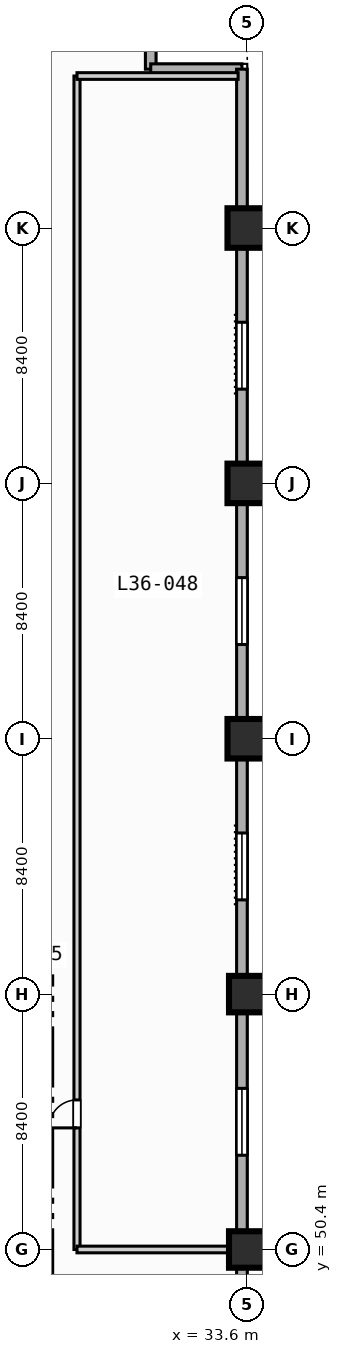
"""IFC4 building model, lengths in metres.
Left out: names, types, materials, properties, quantities, classifications, styles, units other than length and angle.
Written with IfcOpenShell. Run it as: python <this file> out.ifc"""

import sys

from ifc_helpers import new_model, si_unit, direction, frame, frame_2d, origin, origin_2d, place, context, subcontext, project, spatial, rectangle, extrude, element, fill, save


model = new_model("IFC4")
c1 = context("Model", 3, precision=1e-05, world=origin(), true_north=direction((0.0, 1.0)))
c2 = subcontext(c1, "Body", "Model", "MODEL_VIEW")
j1 = project(units=[si_unit("LENGTHUNIT", "METRE"), si_unit("PLANEANGLEUNIT", "RADIAN")], contexts=[c1])
p1 = place(None, origin())
s1 = spatial("IfcSite", under=j1, at=p1, CompositionType="ELEMENT")
p2 = place(p1, origin())
s2 = spatial("IfcBuilding", under=s1, at=p2, CompositionType="ELEMENT")
p3 = place(p2, frame((0.0, 0.0, 149.4)))
s3 = spatial("IfcBuildingStorey", under=s2, at=p3, CompositionType="ELEMENT", Elevation=149.4)
for number, where, z_axis, x_axis in (
    (1, (33.6, 50.4, 0.0), (0.0, 0.0, 1.0), (1.0, 0.0, 0.0)),
    (2, (33.6, 58.8, 0.0), (0.0, 0.0, 1.0), (1.0, 0.0, 0.0)),
):
    element("IfcColumn", number, at=place(p3, frame(where, z_axis=z_axis, x_axis=x_axis)), inside=s3, PredefinedType="COLUMN", context=c2, shape_type="SweptSolid", body=[
        extrude(rectangle(XDim=1.2, YDim=1.2, at=origin_2d()), origin(), (0.0, 0.0, 1.0), 3.8),
    ])
for number, where, z_axis, x_axis in (
    (3, (33.6, 67.2, 0.0), (0.0, 0.0, 1.0), (1.0, 0.0, 0.0)),
    (4, (33.6, 75.6, 0.0), (0.0, 0.0, 1.0), (1.0, 0.0, 0.0)),
    (5, (33.6, 84.0, 0.0), (0.0, 0.0, 1.0), (1.0, 0.0, 0.0)),
):
    element("IfcColumn", number, at=place(p3, frame(where, z_axis=z_axis, x_axis=x_axis)), inside=s3, PredefinedType="COLUMN", context=c2, shape_type="SweptSolid", body=[
        extrude(rectangle(XDim=1.3, YDim=1.3, at=origin_2d()), origin(), (0.0, 0.0, 1.0), 3.8),
    ])
for number, where, z_axis, x_axis in (
    (6, (30.425, 92.225, 0.0), (0.0, 0.0, 1.0), (0.0, -1.0, 0.0)),
    (7, (30.425, 89.225, 0.0), (0.0, 0.0, 1.0), (1.0, 0.0, 0.0)),
):
    element("IfcWall", number, at=place(p3, frame(where, z_axis=z_axis, x_axis=x_axis)), inside=s3, PredefinedType="STANDARD", context=c2, shape_type="SweptSolid", body=[
        extrude(rectangle(XDim=3.0, YDim=0.35, at=frame_2d((1.5, 0.0))), origin(), (0.0, 0.0, 1.0), 3.55),
    ])
p4 = place(p3, frame((33.425, 89.225, 0.0), z_axis=(0.0, 0.0, 1.0), x_axis=(0.0, -1.0, 0.0)))
e8 = element("IfcWall", 8, at=p4, inside=s3, PredefinedType="STANDARD", context=c2, shape_type="SweptSolid", body=[
    extrude(rectangle(XDim=55.8, YDim=0.35, at=frame_2d((27.9, 0.0))), origin(), (0.0, 0.0, 1.0), 3.55),
])
p5 = place(p4, frame((50.325, 0.0, 0.85)))
e9 = element("IfcOpeningElement", 9, at=p5, cuts=e8, PredefinedType="OPENING", context=c2, shape_type="SweptSolid", body=[
    extrude(rectangle(XDim=2.2, YDim=1.8, at=frame_2d((1.1, 0.9))), frame((0.0, 0.185, 0.0), z_axis=(0.0, -1.0, 0.0), x_axis=(1.0, 0.0, 0.0)), (0.0, 0.0, 1.0), 0.37),
])
p6 = place(p4, frame((33.525, 0.0, 0.85)))
e10 = element("IfcOpeningElement", 10, at=p6, cuts=e8, PredefinedType="OPENING", context=c2, shape_type="SweptSolid", body=[
    extrude(rectangle(XDim=2.2, YDim=1.8, at=frame_2d((1.1, 0.9))), frame((0.0, 0.185, 0.0), z_axis=(0.0, -1.0, 0.0), x_axis=(1.0, 0.0, 0.0)), (0.0, 0.0, 1.0), 0.37),
])
p7 = place(p4, frame((25.125, 0.0, 0.85)))
e11 = element("IfcOpeningElement", 11, at=p7, cuts=e8, PredefinedType="OPENING", context=c2, shape_type="SweptSolid", body=[
    extrude(rectangle(XDim=2.2, YDim=1.8, at=frame_2d((1.1, 0.9))), frame((0.0, 0.185, 0.0), z_axis=(0.0, -1.0, 0.0), x_axis=(1.0, 0.0, 0.0)), (0.0, 0.0, 1.0), 0.37),
])
p8 = place(p4, frame((16.725, 0.0, 0.85)))
e12 = element("IfcOpeningElement", 12, at=p8, cuts=e8, PredefinedType="OPENING", context=c2, shape_type="SweptSolid", body=[
    extrude(rectangle(XDim=2.2, YDim=1.8, at=frame_2d((1.1, 0.9))), frame((0.0, 0.185, 0.0), z_axis=(0.0, -1.0, 0.0), x_axis=(1.0, 0.0, 0.0)), (0.0, 0.0, 1.0), 0.37),
])
p9 = place(p4, frame((8.325, 0.0, 0.85)))
e13 = element("IfcOpeningElement", 13, at=p9, cuts=e8, PredefinedType="OPENING", context=c2, shape_type="SweptSolid", body=[
    extrude(rectangle(XDim=2.2, YDim=1.8, at=frame_2d((1.1, 0.9))), frame((0.0, 0.185, 0.0), z_axis=(0.0, -1.0, 0.0), x_axis=(1.0, 0.0, 0.0)), (0.0, 0.0, 1.0), 0.37),
])
p10 = place(p3, frame((28.0, 50.4, 0.0), z_axis=(0.0, 0.0, 1.0), x_axis=(0.0, 1.0, 0.0)))
e14 = element("IfcWall", 14, at=p10, inside=s3, PredefinedType="PARTITIONING", context=c2, shape_type="SweptSolid", body=[
    extrude(rectangle(XDim=38.6, YDim=0.2, at=frame_2d((19.3, 0.0))), origin(), (0.0, 0.0, 1.0), 3.55),
])
p11 = place(p10, frame((4.0, 0.0, 0.0)))
e15 = element("IfcOpeningElement", 15, at=p11, cuts=e14, PredefinedType="OPENING", context=c2, shape_type="SweptSolid", body=[
    extrude(rectangle(XDim=0.92, YDim=2.1, at=frame_2d((0.46, 1.05))), frame((0.0, 0.11, 0.0), z_axis=(0.0, -1.0, 0.0), x_axis=(1.0, 0.0, 0.0)), (0.0, 0.0, 1.0), 0.22),
])
p12 = place(p3, frame((28.0, 50.4, 0.0), z_axis=(0.0, 0.0, 1.0), x_axis=(1.0, 0.0, 0.0)))
e16 = element("IfcWall", 16, at=p12, inside=s3, PredefinedType="PARTITIONING", context=c2, shape_type="SweptSolid", body=[
    extrude(rectangle(XDim=5.3, YDim=0.22, at=frame_2d((2.65, 0.0))), origin(), (0.0, 0.0, 1.0), 3.187),
])
p13 = place(p3, frame((28.0, 89.0, 0.0), z_axis=(0.0, 0.0, 1.0), x_axis=(1.0, 0.0, 0.0)))
e17 = element("IfcWall", 17, at=p13, inside=s3, PredefinedType="PARTITIONING", context=c2, shape_type="SweptSolid", body=[
    extrude(rectangle(XDim=5.3, YDim=0.22, at=frame_2d((2.65, 0.0))), origin(), (0.0, 0.0, 1.0), 3.55),
])
p14 = place(p6, origin())
e18 = element("IfcWindow", 18, at=p14, inside=s3, PartitioningType="SINGLE_PANEL", PredefinedType="WINDOW", context=c2, shape_type="SweptSolid", body=[
    extrude(rectangle(XDim=2.2, YDim=1.8, at=frame_2d((1.1, 0.9))), frame((0.0, 0.03, 0.0), z_axis=(0.0, -1.0, 0.0), x_axis=(1.0, 0.0, 0.0)), (0.0, 0.0, 1.0), 0.06),
])
fill(e10, e18)
p15 = place(p7, origin())
e19 = element("IfcWindow", 19, at=p15, inside=s3, PartitioningType="SINGLE_PANEL", PredefinedType="WINDOW", context=c2, shape_type="SweptSolid", body=[
    extrude(rectangle(XDim=2.2, YDim=1.8, at=frame_2d((1.1, 0.9))), frame((0.0, 0.03, 0.0), z_axis=(0.0, -1.0, 0.0), x_axis=(1.0, 0.0, 0.0)), (0.0, 0.0, 1.0), 0.06),
])
fill(e11, e19)
p16 = place(p8, origin())
e20 = element("IfcWindow", 20, at=p16, inside=s3, PartitioningType="SINGLE_PANEL", PredefinedType="WINDOW", context=c2, shape_type="SweptSolid", body=[
    extrude(rectangle(XDim=2.2, YDim=1.8, at=frame_2d((1.1, 0.9))), frame((0.0, 0.03, 0.0), z_axis=(0.0, -1.0, 0.0), x_axis=(1.0, 0.0, 0.0)), (0.0, 0.0, 1.0), 0.06),
])
fill(e12, e20)
p17 = place(p9, origin())
e21 = element("IfcWindow", 21, at=p17, inside=s3, PartitioningType="SINGLE_PANEL", PredefinedType="WINDOW", context=c2, shape_type="SweptSolid", body=[
    extrude(rectangle(XDim=2.2, YDim=1.8, at=frame_2d((1.1, 0.9))), frame((0.0, 0.03, 0.0), z_axis=(0.0, -1.0, 0.0), x_axis=(1.0, 0.0, 0.0)), (0.0, 0.0, 1.0), 0.06),
])
fill(e13, e21)
p18 = place(p11, origin())
e22 = element("IfcDoor", 22, at=p18, inside=s3, OperationType="SINGLE_SWING_LEFT", PredefinedType="DOOR", context=c2, shape_type="SweptSolid", body=[
    extrude(rectangle(XDim=0.92, YDim=2.1, at=frame_2d((0.46, 1.05))), frame((0.0, 0.025, 0.0), z_axis=(0.0, -1.0, 0.0), x_axis=(1.0, 0.0, 0.0)), (0.0, 0.0, 1.0), 0.05),
])
fill(e15, e22)
save(model, sys.argv[1])
